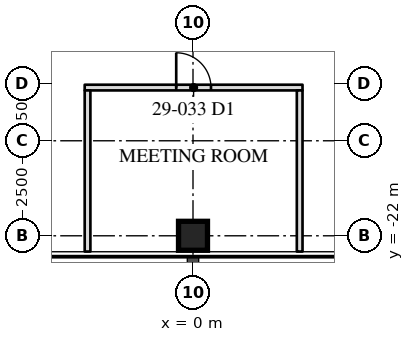
"""IFC4 building model, lengths in metres.
Left out: names, types, materials, properties, quantities, classifications, styles, units other than length and angle.
Written with IfcOpenShell. Run it as: python <this file> out.ifc"""

import sys

from ifc_helpers import new_model, si_unit, direction, frame, frame_2d, origin, origin_2d, place, context, subcontext, project, spatial, rectangle, hollow_rectangle, extrude, element, fill, save


model = new_model("IFC4")
c1 = context("Model", 3, precision=1e-05, world=origin(), true_north=direction((0.0, 1.0)))
c2 = subcontext(c1, "Body", "Model", "MODEL_VIEW")
j1 = project(units=[si_unit("LENGTHUNIT", "METRE"), si_unit("PLANEANGLEUNIT", "RADIAN")], contexts=[c1])
p1 = place(None, origin())
s1 = spatial("IfcSite", under=j1, at=p1, CompositionType="ELEMENT")
p2 = place(p1, origin())
s2 = spatial("IfcBuilding", under=s1, at=p2, CompositionType="ELEMENT")
p3 = place(p2, frame((0.0, 0.0, 125.4)))
s3 = spatial("IfcBuildingStorey", under=s2, at=p3, CompositionType="ELEMENT", Elevation=125.4)
p4 = place(p3, frame((0.0, -22.0, 0.0), z_axis=(0.0, 0.0, 1.0), x_axis=(1.0, 0.0, 0.0)))
e1 = element("IfcColumn", 1, at=p4, inside=s3, PredefinedType="COLUMN", context=c2, shape_type="SweptSolid", body=[
    extrude(hollow_rectangle(XDim=0.762, YDim=0.762, WallThickness=0.076, at=origin_2d()), origin(), (0.0, 0.0, 1.0), 4.1),
])
p5 = place(p3, frame((-2.85, -18.1, 0.0), z_axis=(0.0, 0.0, 1.0), x_axis=(1.0, 0.0, 0.0)))
e2 = element("IfcWall", 2, at=p5, inside=s3, PredefinedType="PARTITIONING", context=c2, shape_type="SweptSolid", body=[
    extrude(rectangle(XDim=5.732, YDim=0.15, at=frame_2d((2.866, 0.0))), origin(), (0.0, 0.0, 1.0), 3.91),
])
p6 = place(p5, frame((2.408, 0.0, 0.0)))
e3 = element("IfcOpeningElement", 3, at=p6, cuts=e2, PredefinedType="OPENING", context=c2, shape_type="SweptSolid", body=[
    extrude(rectangle(XDim=0.915, YDim=2.134, at=frame_2d((0.458, 1.067))), frame((0.0, 0.085, 0.0), z_axis=(0.0, -1.0, 0.0), x_axis=(1.0, 0.0, 0.0)), (0.0, 0.0, 1.0), 0.17),
])
for number, where, z_axis, x_axis in (
    (4, (-2.775, -18.175, 0.0), (0.0, 0.0, 1.0), (0.0, -1.0, 0.0)),
    (5, (2.807, -18.175, 0.0), (0.0, 0.0, 1.0), (0.0, -1.0, 0.0)),
):
    element("IfcWall", number, at=place(p3, frame(where, z_axis=z_axis, x_axis=x_axis)), inside=s3, PredefinedType="PARTITIONING", context=c2, shape_type="SweptSolid", body=[
        extrude(rectangle(XDim=4.24, YDim=0.15, at=frame_2d((2.12, 0.0))), origin(), (0.0, 0.0, 1.0), 3.91),
    ])
p7 = place(p6, origin())
e6 = element("IfcDoor", 6, at=p7, inside=s3, OperationType="SINGLE_SWING_LEFT", PredefinedType="DOOR", context=c2, shape_type="SweptSolid", body=[
    extrude(rectangle(XDim=0.915, YDim=2.134, at=frame_2d((0.458, 1.067))), frame((0.0, 0.025, 0.0), z_axis=(0.0, -1.0, 0.0), x_axis=(1.0, 0.0, 0.0)), (0.0, 0.0, 1.0), 0.05),
])
fill(e3, e6)
save(model, sys.argv[1])
